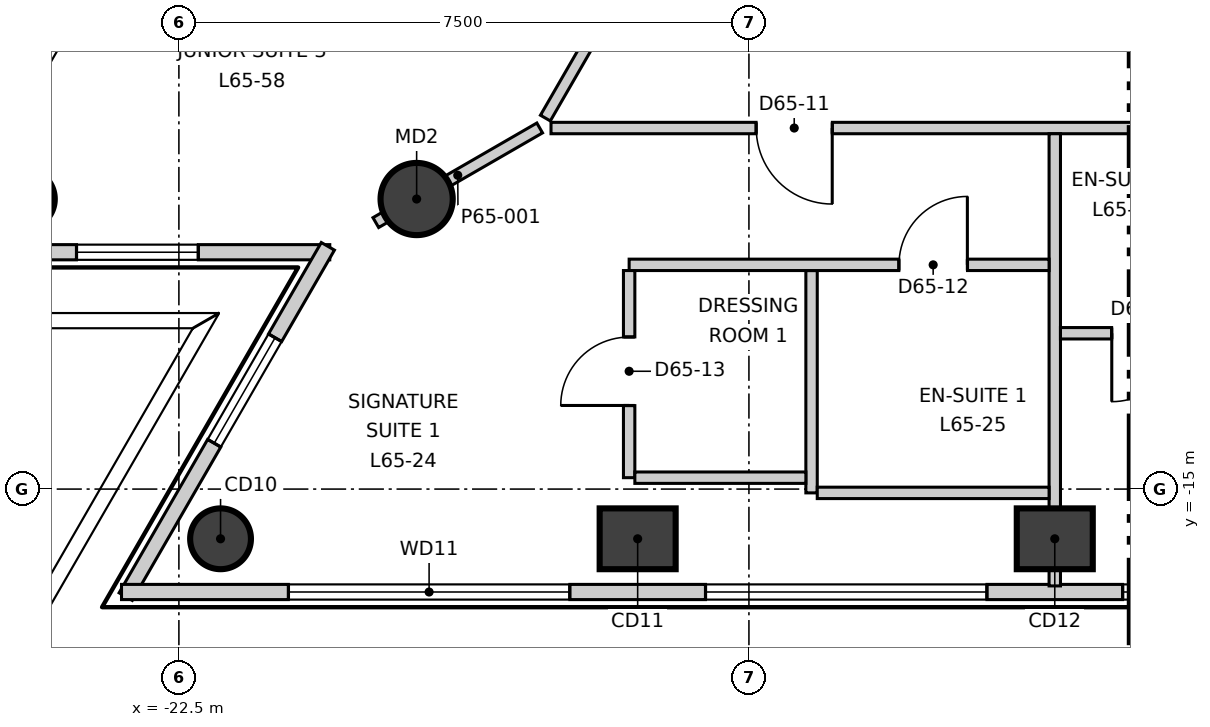
"""IFC4 building model, lengths in metres.
Left out: names, types, materials, properties, quantities, classifications, styles, units other than length and angle.
Written with IfcOpenShell. Run it as: python <this file> out.ifc"""

import sys

from ifc_helpers import new_model, si_unit, direction, frame, frame_2d, origin, origin_2d, place, context, subcontext, project, spatial, rectangle, circle, extrude, element, fill, save


model = new_model("IFC4")
c1 = context("Model", 3, precision=1e-05, world=origin(), true_north=direction((0.0, 1.0)))
c2 = subcontext(c1, "Body", "Model", "MODEL_VIEW")
j1 = project(units=[si_unit("LENGTHUNIT", "METRE"), si_unit("PLANEANGLEUNIT", "RADIAN")], contexts=[c1])
p1 = place(None, origin())
s1 = spatial("IfcSite", under=j1, at=p1, CompositionType="ELEMENT")
p2 = place(p1, origin())
s2 = spatial("IfcBuilding", under=s1, at=p2, CompositionType="ELEMENT")
p3 = place(p2, frame((0.0, 0.0, 279.1)))
s3 = spatial("IfcBuildingStorey", under=s2, at=p3, CompositionType="ELEMENT", Elevation=279.1)
for number, where, z_axis, x_axis in (
    (1, (-24.533, -11.184, -0.3), (0.0, 0.0, 1.0), (0.5, 0.866, 0.0)),
    (2, (-21.952, -15.654, -0.3), (0.0, 0.0, 1.0), (1.0, 0.0, 0.0)),
):
    element("IfcColumn", number, at=place(p3, frame(where, z_axis=z_axis, x_axis=x_axis)), inside=s3, PredefinedType="COLUMN", context=c2, shape_type="SweptSolid", body=[
        extrude(circle(Radius=0.4, at=origin_2d()), origin(), (0.0, 0.0, 1.0), 3.6),
    ])
for number, where, z_axis, x_axis in (
    (3, (-16.464, -15.654, -0.3), (0.0, 0.0, 1.0), (1.0, 0.0, 0.0)),
    (4, (-10.976, -15.654, -0.3), (0.0, 0.0, 1.0), (1.0, 0.0, 0.0)),
):
    element("IfcColumn", number, at=place(p3, frame(where, z_axis=z_axis, x_axis=x_axis)), inside=s3, PredefinedType="COLUMN", context=c2, shape_type="SweptSolid", body=[
        extrude(rectangle(XDim=1.0, YDim=0.8, at=origin_2d()), origin(), (0.0, 0.0, 1.0), 3.6),
    ])
p4 = place(p3, frame((-19.372, -11.184, -0.3), z_axis=(0.0, 0.0, 1.0), x_axis=(1.0, 0.0, 0.0)))
e5 = element("IfcColumn", 5, at=p4, inside=s3, PredefinedType="COLUMN", context=c2, shape_type="SweptSolid", body=[
    extrude(circle(Radius=0.475, at=origin_2d()), origin(), (0.0, 0.0, 1.0), 3.6),
])
p5 = place(p3, frame((-2.536, 28.316, 0.0), z_axis=(0.0, 0.0, 1.0), x_axis=(-0.500006870765, -0.86602143691, 0.0)))
e6 = element("IfcWall", 6, at=p5, inside=s3, PredefinedType="ELEMENTEDWALL", context=c2, shape_type="SweptSolid", body=[
    extrude(rectangle(XDim=46.49, YDim=0.2, at=frame_2d((23.245, 0.0))), origin(), (0.0, 0.0, 1.0), 3.3),
])
p6 = place(p5, frame((2.196, 0.0, 0.9)))
e7 = element("IfcOpeningElement", 7, at=p6, cuts=e6, PredefinedType="OPENING", context=c2, shape_type="SweptSolid", body=[
    extrude(rectangle(XDim=3.7, YDim=2.2, at=frame_2d((1.85, 1.1))), frame((0.0, 0.11, 0.0), z_axis=(0.0, -1.0, 0.0), x_axis=(1.0, 0.0, 0.0)), (0.0, 0.0, 1.0), 0.22),
])
p7 = place(p5, frame((7.684, 0.0, 0.9)))
e8 = element("IfcOpeningElement", 8, at=p7, cuts=e6, PredefinedType="OPENING", context=c2, shape_type="SweptSolid", body=[
    extrude(rectangle(XDim=3.7, YDim=2.2, at=frame_2d((1.85, 1.1))), frame((0.0, 0.11, 0.0), z_axis=(0.0, -1.0, 0.0), x_axis=(1.0, 0.0, 0.0)), (0.0, 0.0, 1.0), 0.22),
])
p8 = place(p5, frame((13.172, 0.0, 0.9)))
e9 = element("IfcOpeningElement", 9, at=p8, cuts=e6, PredefinedType="OPENING", context=c2, shape_type="SweptSolid", body=[
    extrude(rectangle(XDim=3.7, YDim=2.2, at=frame_2d((1.85, 1.1))), frame((0.0, 0.11, 0.0), z_axis=(0.0, -1.0, 0.0), x_axis=(1.0, 0.0, 0.0)), (0.0, 0.0, 1.0), 0.22),
])
p9 = place(p5, frame((18.66, 0.0, 0.9)))
e10 = element("IfcOpeningElement", 10, at=p9, cuts=e6, PredefinedType="OPENING", context=c2, shape_type="SweptSolid", body=[
    extrude(rectangle(XDim=3.7, YDim=2.2, at=frame_2d((1.85, 1.1))), frame((0.0, 0.11, 0.0), z_axis=(0.0, -1.0, 0.0), x_axis=(1.0, 0.0, 0.0)), (0.0, 0.0, 1.0), 0.22),
])
p10 = place(p5, frame((24.148, 0.0, 0.9)))
e11 = element("IfcOpeningElement", 11, at=p10, cuts=e6, PredefinedType="OPENING", context=c2, shape_type="SweptSolid", body=[
    extrude(rectangle(XDim=3.7, YDim=2.2, at=frame_2d((1.85, 1.1))), frame((0.0, 0.11, 0.0), z_axis=(0.0, -1.0, 0.0), x_axis=(1.0, 0.0, 0.0)), (0.0, 0.0, 1.0), 0.22),
])
p11 = place(p5, frame((29.636, 0.0, 0.9)))
e12 = element("IfcOpeningElement", 12, at=p11, cuts=e6, PredefinedType="OPENING", context=c2, shape_type="SweptSolid", body=[
    extrude(rectangle(XDim=3.7, YDim=2.2, at=frame_2d((1.85, 1.1))), frame((0.0, 0.11, 0.0), z_axis=(0.0, -1.0, 0.0), x_axis=(1.0, 0.0, 0.0)), (0.0, 0.0, 1.0), 0.22),
])
p12 = place(p5, frame((35.124, 0.0, 0.9)))
e13 = element("IfcOpeningElement", 13, at=p12, cuts=e6, PredefinedType="OPENING", context=c2, shape_type="SweptSolid", body=[
    extrude(rectangle(XDim=3.7, YDim=2.2, at=frame_2d((1.85, 1.1))), frame((0.0, 0.11, 0.0), z_axis=(0.0, -1.0, 0.0), x_axis=(1.0, 0.0, 0.0)), (0.0, 0.0, 1.0), 0.22),
])
p13 = place(p5, frame((40.612, 0.0, 0.9)))
e14 = element("IfcOpeningElement", 14, at=p13, cuts=e6, PredefinedType="OPENING", context=c2, shape_type="SweptSolid", body=[
    extrude(rectangle(XDim=3.7, YDim=2.2, at=frame_2d((1.85, 1.1))), frame((0.0, 0.11, 0.0), z_axis=(0.0, -1.0, 0.0), x_axis=(1.0, 0.0, 0.0)), (0.0, 0.0, 1.0), 0.22),
])
p14 = place(p3, frame((-25.836, -11.884, 0.0), z_axis=(0.0, 0.0, 1.0), x_axis=(1.0, 0.0, 0.0)))
e15 = element("IfcWall", 15, at=p14, inside=s3, PredefinedType="ELEMENTEDWALL", context=c2, shape_type="SweptSolid", body=[
    extrude(rectangle(XDim=5.321, YDim=0.2, at=frame_2d((2.661, 0.0))), origin(), (0.0, 0.0, 1.0), 3.3),
])
p15 = place(p14, frame((1.99, 0.0, 0.9)))
e16 = element("IfcOpeningElement", 16, at=p15, cuts=e15, PredefinedType="OPENING", context=c2, shape_type="SweptSolid", body=[
    extrude(rectangle(XDim=1.6, YDim=2.2, at=frame_2d((0.8, 1.1))), frame((0.0, 0.11, 0.0), z_axis=(0.0, -1.0, 0.0), x_axis=(1.0, 0.0, 0.0)), (0.0, 0.0, 1.0), 0.22),
])
p16 = place(p3, frame((-20.54, -11.806, 0.0), z_axis=(0.0, 0.0, 1.0), x_axis=(-0.499834978903, -0.866120657798, 0.0)))
e17 = element("IfcWall", 17, at=p16, inside=s3, PredefinedType="ELEMENTEDWALL", context=c2, shape_type="SweptSolid", body=[
    extrude(rectangle(XDim=5.322, YDim=0.2, at=frame_2d((2.661, 0.0))), origin(), (0.0, 0.0, 1.0), 3.3),
])
p17 = place(p16, frame((1.39, 0.0, 0.9)))
e18 = element("IfcOpeningElement", 18, at=p17, cuts=e17, PredefinedType="OPENING", context=c2, shape_type="SweptSolid", body=[
    extrude(rectangle(XDim=1.6, YDim=2.2, at=frame_2d((0.8, 1.1))), frame((0.0, 0.11, 0.0), z_axis=(0.0, -1.0, 0.0), x_axis=(1.0, 0.0, 0.0)), (0.0, 0.0, 1.0), 0.22),
])
p18 = place(p3, frame((-23.255, -16.354, 0.0), z_axis=(0.0, 0.0, 1.0), x_axis=(1.0, 0.0, 0.0)))
e19 = element("IfcWall", 19, at=p18, inside=s3, PredefinedType="ELEMENTEDWALL", context=c2, shape_type="SweptSolid", body=[
    extrude(rectangle(XDim=46.49, YDim=0.2, at=frame_2d((23.245, 0.0))), origin(), (0.0, 0.0, 1.0), 3.3),
])
p19 = place(p18, frame((2.197, 0.0, 0.9)))
e20 = element("IfcOpeningElement", 20, at=p19, cuts=e19, PredefinedType="OPENING", context=c2, shape_type="SweptSolid", body=[
    extrude(rectangle(XDim=3.7, YDim=2.2, at=frame_2d((1.85, 1.1))), frame((0.0, 0.11, 0.0), z_axis=(0.0, -1.0, 0.0), x_axis=(1.0, 0.0, 0.0)), (0.0, 0.0, 1.0), 0.22),
])
p20 = place(p18, frame((7.685, 0.0, 0.9)))
e21 = element("IfcOpeningElement", 21, at=p20, cuts=e19, PredefinedType="OPENING", context=c2, shape_type="SweptSolid", body=[
    extrude(rectangle(XDim=3.7, YDim=2.2, at=frame_2d((1.85, 1.1))), frame((0.0, 0.11, 0.0), z_axis=(0.0, -1.0, 0.0), x_axis=(1.0, 0.0, 0.0)), (0.0, 0.0, 1.0), 0.22),
])
p21 = place(p18, frame((13.173, 0.0, 0.9)))
e22 = element("IfcOpeningElement", 22, at=p21, cuts=e19, PredefinedType="OPENING", context=c2, shape_type="SweptSolid", body=[
    extrude(rectangle(XDim=3.7, YDim=2.2, at=frame_2d((1.85, 1.1))), frame((0.0, 0.11, 0.0), z_axis=(0.0, -1.0, 0.0), x_axis=(1.0, 0.0, 0.0)), (0.0, 0.0, 1.0), 0.22),
])
p22 = place(p18, frame((18.661, 0.0, 0.9)))
e23 = element("IfcOpeningElement", 23, at=p22, cuts=e19, PredefinedType="OPENING", context=c2, shape_type="SweptSolid", body=[
    extrude(rectangle(XDim=3.7, YDim=2.2, at=frame_2d((1.85, 1.1))), frame((0.0, 0.11, 0.0), z_axis=(0.0, -1.0, 0.0), x_axis=(1.0, 0.0, 0.0)), (0.0, 0.0, 1.0), 0.22),
])
p23 = place(p18, frame((24.149, 0.0, 0.9)))
e24 = element("IfcOpeningElement", 24, at=p23, cuts=e19, PredefinedType="OPENING", context=c2, shape_type="SweptSolid", body=[
    extrude(rectangle(XDim=3.7, YDim=2.2, at=frame_2d((1.85, 1.1))), frame((0.0, 0.11, 0.0), z_axis=(0.0, -1.0, 0.0), x_axis=(1.0, 0.0, 0.0)), (0.0, 0.0, 1.0), 0.22),
])
p24 = place(p18, frame((29.637, 0.0, 0.9)))
e25 = element("IfcOpeningElement", 25, at=p24, cuts=e19, PredefinedType="OPENING", context=c2, shape_type="SweptSolid", body=[
    extrude(rectangle(XDim=3.7, YDim=2.2, at=frame_2d((1.85, 1.1))), frame((0.0, 0.11, 0.0), z_axis=(0.0, -1.0, 0.0), x_axis=(1.0, 0.0, 0.0)), (0.0, 0.0, 1.0), 0.22),
])
p25 = place(p18, frame((35.125, 0.0, 0.9)))
e26 = element("IfcOpeningElement", 26, at=p25, cuts=e19, PredefinedType="OPENING", context=c2, shape_type="SweptSolid", body=[
    extrude(rectangle(XDim=3.7, YDim=2.2, at=frame_2d((1.85, 1.1))), frame((0.0, 0.11, 0.0), z_axis=(0.0, -1.0, 0.0), x_axis=(1.0, 0.0, 0.0)), (0.0, 0.0, 1.0), 0.22),
])
p26 = place(p18, frame((40.613, 0.0, 0.9)))
e27 = element("IfcOpeningElement", 27, at=p26, cuts=e19, PredefinedType="OPENING", context=c2, shape_type="SweptSolid", body=[
    extrude(rectangle(XDim=3.7, YDim=2.2, at=frame_2d((1.85, 1.1))), frame((0.0, 0.11, 0.0), z_axis=(0.0, -1.0, 0.0), x_axis=(1.0, 0.0, 0.0)), (0.0, 0.0, 1.0), 0.22),
])
p27 = place(p3, frame((-19.909, -11.494, 0.0), z_axis=(0.0, 0.0, 1.0), x_axis=(0.86600757835, 0.500030873288, 0.0)))
e28 = element("IfcWall", 28, at=p27, inside=s3, PredefinedType="PARTITIONING", context=c2, shape_type="SweptSolid", body=[
    extrude(rectangle(XDim=2.49, YDim=0.15, at=frame_2d((1.245, 0.0))), origin(), (0.0, 0.0, 1.0), 2.8),
])
p28 = place(p3, frame((-17.678, -10.119, 0.0), z_axis=(0.0, 0.0, 1.0), x_axis=(0.500003190174, 0.866023561929, 0.0)))
e29 = element("IfcWall", 29, at=p28, inside=s3, PredefinedType="PARTITIONING", context=c2, shape_type="SweptSolid", body=[
    extrude(rectangle(XDim=35.356, YDim=0.15, at=frame_2d((17.678, 0.0))), origin(), (0.0, 0.0, 1.0), 3.3),
])
p29 = place(p28, frame((28.706, 0.0, 0.0)))
e30 = element("IfcOpeningElement", 30, at=p29, cuts=e29, PredefinedType="OPENING", context=c2, shape_type="SweptSolid", body=[
    extrude(rectangle(XDim=1.0, YDim=2.1, at=frame_2d((0.5, 1.05))), frame((0.0, 0.085, 0.0), z_axis=(0.0, -1.0, 0.0), x_axis=(1.0, 0.0, 0.0)), (0.0, 0.0, 1.0), 0.17),
])
p30 = place(p28, frame((18.74, 0.0, 0.0)))
e31 = element("IfcOpeningElement", 31, at=p30, cuts=e29, PredefinedType="OPENING", context=c2, shape_type="SweptSolid", body=[
    extrude(rectangle(XDim=1.0, YDim=2.1, at=frame_2d((0.5, 1.05))), frame((0.0, 0.085, 0.0), z_axis=(0.0, -1.0, 0.0), x_axis=(1.0, 0.0, 0.0)), (0.0, 0.0, 1.0), 0.17),
])
p31 = place(p28, frame((9.352, 0.0, 0.0)))
e32 = element("IfcOpeningElement", 32, at=p31, cuts=e29, PredefinedType="OPENING", context=c2, shape_type="SweptSolid", body=[
    extrude(rectangle(XDim=1.0, YDim=2.1, at=frame_2d((0.5, 1.05))), frame((0.0, 0.085, 0.0), z_axis=(0.0, -1.0, 0.0), x_axis=(1.0, 0.0, 0.0)), (0.0, 0.0, 1.0), 0.17),
])
p32 = place(p28, frame((2.777, 0.0, 0.0)))
e33 = element("IfcOpeningElement", 33, at=p32, cuts=e29, PredefinedType="OPENING", context=c2, shape_type="SweptSolid", body=[
    extrude(rectangle(XDim=1.0, YDim=2.1, at=frame_2d((0.5, 1.05))), frame((0.0, 0.085, 0.0), z_axis=(0.0, -1.0, 0.0), x_axis=(1.0, 0.0, 0.0)), (0.0, 0.0, 1.0), 0.17),
])
p33 = place(p3, frame((-17.604, -10.25, 0.0), z_axis=(0.0, 0.0, 1.0), x_axis=(1.0, 0.0, 0.0)))
e34 = element("IfcWall", 34, at=p33, inside=s3, PredefinedType="PARTITIONING", context=c2, shape_type="SweptSolid", body=[
    extrude(rectangle(XDim=35.358, YDim=0.15, at=frame_2d((17.679, 0.0))), origin(), (0.0, 0.0, 1.0), 3.3),
])
p34 = place(p33, frame((2.7, 0.0, 0.0)))
e35 = element("IfcOpeningElement", 35, at=p34, cuts=e34, PredefinedType="OPENING", context=c2, shape_type="SweptSolid", body=[
    extrude(rectangle(XDim=1.0, YDim=2.1, at=frame_2d((0.5, 1.05))), frame((0.0, 0.085, 0.0), z_axis=(0.0, -1.0, 0.0), x_axis=(1.0, 0.0, 0.0)), (0.0, 0.0, 1.0), 0.17),
])
p35 = place(p33, frame((14.878, 0.0, 0.0)))
e36 = element("IfcOpeningElement", 36, at=p35, cuts=e34, PredefinedType="OPENING", context=c2, shape_type="SweptSolid", body=[
    extrude(rectangle(XDim=1.0, YDim=2.1, at=frame_2d((0.5, 1.05))), frame((0.0, 0.085, 0.0), z_axis=(0.0, -1.0, 0.0), x_axis=(1.0, 0.0, 0.0)), (0.0, 0.0, 1.0), 0.17),
])
p36 = place(p33, frame((9.578, 0.0, 0.0)))
e37 = element("IfcOpeningElement", 37, at=p36, cuts=e34, PredefinedType="OPENING", context=c2, shape_type="SweptSolid", body=[
    extrude(rectangle(XDim=0.9, YDim=2.1, at=frame_2d((0.45, 1.05))), frame((0.0, 0.085, 0.0), z_axis=(0.0, -1.0, 0.0), x_axis=(1.0, 0.0, 0.0)), (0.0, 0.0, 1.0), 0.17),
])
p37 = place(p33, frame((11.678, 0.0, 0.0)))
e38 = element("IfcOpeningElement", 38, at=p37, cuts=e34, PredefinedType="OPENING", context=c2, shape_type="SweptSolid", body=[
    extrude(rectangle(XDim=0.9, YDim=2.1, at=frame_2d((0.45, 1.05))), frame((0.0, 0.085, 0.0), z_axis=(0.0, -1.0, 0.0), x_axis=(1.0, 0.0, 0.0)), (0.0, 0.0, 1.0), 0.17),
])
p38 = place(p33, frame((25.854, 0.0, 0.0)))
e39 = element("IfcOpeningElement", 39, at=p38, cuts=e34, PredefinedType="OPENING", context=c2, shape_type="SweptSolid", body=[
    extrude(rectangle(XDim=1.0, YDim=2.1, at=frame_2d((0.5, 1.05))), frame((0.0, 0.085, 0.0), z_axis=(0.0, -1.0, 0.0), x_axis=(1.0, 0.0, 0.0)), (0.0, 0.0, 1.0), 0.17),
])
p39 = place(p33, frame((20.554, 0.0, 0.0)))
e40 = element("IfcOpeningElement", 40, at=p39, cuts=e34, PredefinedType="OPENING", context=c2, shape_type="SweptSolid", body=[
    extrude(rectangle(XDim=0.9, YDim=2.1, at=frame_2d((0.45, 1.05))), frame((0.0, 0.085, 0.0), z_axis=(0.0, -1.0, 0.0), x_axis=(1.0, 0.0, 0.0)), (0.0, 0.0, 1.0), 0.17),
])
p40 = place(p33, frame((22.654, 0.0, 0.0)))
e41 = element("IfcOpeningElement", 41, at=p40, cuts=e34, PredefinedType="OPENING", context=c2, shape_type="SweptSolid", body=[
    extrude(rectangle(XDim=0.9, YDim=2.1, at=frame_2d((0.45, 1.05))), frame((0.0, 0.085, 0.0), z_axis=(0.0, -1.0, 0.0), x_axis=(1.0, 0.0, 0.0)), (0.0, 0.0, 1.0), 0.17),
])
p41 = place(p33, frame((31.43, 0.0, 0.0)))
e42 = element("IfcOpeningElement", 42, at=p41, cuts=e34, PredefinedType="OPENING", context=c2, shape_type="SweptSolid", body=[
    extrude(rectangle(XDim=1.0, YDim=2.1, at=frame_2d((0.5, 1.05))), frame((0.0, 0.085, 0.0), z_axis=(0.0, -1.0, 0.0), x_axis=(1.0, 0.0, 0.0)), (0.0, 0.0, 1.0), 0.17),
])
p42 = place(p3, frame((-10.976, -16.274, 0.0), z_axis=(0.0, 0.0, 1.0), x_axis=(0.0, 1.0, 0.0)))
e43 = element("IfcWall", 43, at=p42, inside=s3, PredefinedType="PARTITIONING", context=c2, shape_type="SweptSolid", body=[
    extrude(rectangle(XDim=5.949, YDim=0.15, at=frame_2d((2.975, 0.0))), origin(), (0.0, 0.0, 1.0), 3.3),
])
p43 = place(p3, frame((-14.176, -15.05, 0.0), z_axis=(0.0, 0.0, 1.0), x_axis=(0.0, 1.0, 0.0)))
e44 = element("IfcWall", 44, at=p43, inside=s3, PredefinedType="PARTITIONING", context=c2, shape_type="SweptSolid", body=[
    extrude(rectangle(XDim=2.925, YDim=0.15, at=frame_2d((1.462, 0.0))), origin(), (0.0, 0.0, 1.0), 3.3),
])
p44 = place(p3, frame((-16.576, -12.05, 0.0), z_axis=(0.0, 0.0, 1.0), x_axis=(1.0, 0.0, 0.0)))
e45 = element("IfcWall", 45, at=p44, inside=s3, PredefinedType="PARTITIONING", context=c2, shape_type="SweptSolid", body=[
    extrude(rectangle(XDim=5.525, YDim=0.15, at=frame_2d((2.762, 0.0))), origin(), (0.0, 0.0, 1.0), 3.3),
])
p45 = place(p44, frame((3.55, 0.0, 0.0)))
e46 = element("IfcOpeningElement", 46, at=p45, cuts=e45, PredefinedType="OPENING", context=c2, shape_type="SweptSolid", body=[
    extrude(rectangle(XDim=0.9, YDim=2.1, at=frame_2d((0.45, 1.05))), frame((0.0, 0.085, 0.0), z_axis=(0.0, -1.0, 0.0), x_axis=(1.0, 0.0, 0.0)), (0.0, 0.0, 1.0), 0.17),
])
p46 = place(p3, frame((-16.576, -14.85, 0.0), z_axis=(0.0, 0.0, 1.0), x_axis=(0.0, 1.0, 0.0)))
e47 = element("IfcWall", 47, at=p46, inside=s3, PredefinedType="PARTITIONING", context=c2, shape_type="SweptSolid", body=[
    extrude(rectangle(XDim=2.725, YDim=0.15, at=frame_2d((1.363, 0.0))), origin(), (0.0, 0.0, 1.0), 3.3),
])
p47 = place(p46, frame((0.95, 0.0, 0.0)))
e48 = element("IfcOpeningElement", 48, at=p47, cuts=e47, PredefinedType="OPENING", context=c2, shape_type="SweptSolid", body=[
    extrude(rectangle(XDim=0.9, YDim=2.1, at=frame_2d((0.45, 1.05))), frame((0.0, 0.085, 0.0), z_axis=(0.0, -1.0, 0.0), x_axis=(1.0, 0.0, 0.0)), (0.0, 0.0, 1.0), 0.17),
])
p48 = place(p3, frame((-16.501, -14.85, 0.0), z_axis=(0.0, 0.0, 1.0), x_axis=(1.0, 0.0, 0.0)))
e49 = element("IfcWall", 49, at=p48, inside=s3, PredefinedType="PARTITIONING", context=c2, shape_type="SweptSolid", body=[
    extrude(rectangle(XDim=2.25, YDim=0.15, at=frame_2d((1.125, 0.0))), origin(), (0.0, 0.0, 1.0), 3.3),
])
p49 = place(p3, frame((-14.101, -15.05, 0.0), z_axis=(0.0, 0.0, 1.0), x_axis=(1.0, 0.0, 0.0)))
e50 = element("IfcWall", 50, at=p49, inside=s3, PredefinedType="PARTITIONING", context=c2, shape_type="SweptSolid", body=[
    extrude(rectangle(XDim=3.05, YDim=0.15, at=frame_2d((1.525, 0.0))), origin(), (0.0, 0.0, 1.0), 3.3),
])
p50 = place(p3, frame((-10.901, -12.95, 0.0), z_axis=(0.0, 0.0, 1.0), x_axis=(1.0, 0.0, 0.0)))
e51 = element("IfcWall", 51, at=p50, inside=s3, PredefinedType="PARTITIONING", context=c2, shape_type="SweptSolid", body=[
    extrude(rectangle(XDim=2.15, YDim=0.15, at=frame_2d((1.075, 0.0))), origin(), (0.0, 0.0, 1.0), 3.3),
])
p51 = place(p50, frame((0.675, 0.0, 0.0)))
e52 = element("IfcOpeningElement", 52, at=p51, cuts=e51, PredefinedType="OPENING", context=c2, shape_type="SweptSolid", body=[
    extrude(rectangle(XDim=0.9, YDim=2.1, at=frame_2d((0.45, 1.05))), frame((0.0, 0.085, 0.0), z_axis=(0.0, -1.0, 0.0), x_axis=(1.0, 0.0, 0.0)), (0.0, 0.0, 1.0), 0.17),
])
p52 = place(p13, origin())
e53 = element("IfcWindow", 53, at=p52, inside=s3, PartitioningType="SINGLE_PANEL", PredefinedType="WINDOW", context=c2, shape_type="SweptSolid", body=[
    extrude(rectangle(XDim=3.7, YDim=2.2, at=frame_2d((1.85, 1.1))), frame((0.0, 0.03, 0.0), z_axis=(0.0, -1.0, 0.0), x_axis=(1.0, 0.0, 0.0)), (0.0, 0.0, 1.0), 0.06),
])
fill(e14, e53)
p53 = place(p15, origin())
e54 = element("IfcWindow", 54, at=p53, inside=s3, PartitioningType="SINGLE_PANEL", PredefinedType="WINDOW", context=c2, shape_type="SweptSolid", body=[
    extrude(rectangle(XDim=1.6, YDim=2.2, at=frame_2d((0.8, 1.1))), frame((0.0, 0.03, 0.0), z_axis=(0.0, -1.0, 0.0), x_axis=(1.0, 0.0, 0.0)), (0.0, 0.0, 1.0), 0.06),
])
fill(e16, e54)
p54 = place(p17, origin())
e55 = element("IfcWindow", 55, at=p54, inside=s3, PartitioningType="SINGLE_PANEL", PredefinedType="WINDOW", context=c2, shape_type="SweptSolid", body=[
    extrude(rectangle(XDim=1.6, YDim=2.2, at=frame_2d((0.8, 1.1))), frame((0.0, 0.03, 0.0), z_axis=(0.0, -1.0, 0.0), x_axis=(1.0, 0.0, 0.0)), (0.0, 0.0, 1.0), 0.06),
])
fill(e18, e55)
p55 = place(p19, origin())
e56 = element("IfcWindow", 56, at=p55, inside=s3, PartitioningType="SINGLE_PANEL", PredefinedType="WINDOW", context=c2, shape_type="SweptSolid", body=[
    extrude(rectangle(XDim=3.7, YDim=2.2, at=frame_2d((1.85, 1.1))), frame((0.0, 0.03, 0.0), z_axis=(0.0, -1.0, 0.0), x_axis=(1.0, 0.0, 0.0)), (0.0, 0.0, 1.0), 0.06),
])
fill(e20, e56)
p56 = place(p20, origin())
e57 = element("IfcWindow", 57, at=p56, inside=s3, PartitioningType="SINGLE_PANEL", PredefinedType="WINDOW", context=c2, shape_type="SweptSolid", body=[
    extrude(rectangle(XDim=3.7, YDim=2.2, at=frame_2d((1.85, 1.1))), frame((0.0, 0.03, 0.0), z_axis=(0.0, -1.0, 0.0), x_axis=(1.0, 0.0, 0.0)), (0.0, 0.0, 1.0), 0.06),
])
fill(e21, e57)
p57 = place(p21, origin())
e58 = element("IfcWindow", 58, at=p57, inside=s3, PartitioningType="SINGLE_PANEL", PredefinedType="WINDOW", context=c2, shape_type="SweptSolid", body=[
    extrude(rectangle(XDim=3.7, YDim=2.2, at=frame_2d((1.85, 1.1))), frame((0.0, 0.03, 0.0), z_axis=(0.0, -1.0, 0.0), x_axis=(1.0, 0.0, 0.0)), (0.0, 0.0, 1.0), 0.06),
])
fill(e22, e58)
p58 = place(p34, origin())
e59 = element("IfcDoor", 59, at=p58, inside=s3, OperationType="SINGLE_SWING_RIGHT", PredefinedType="DOOR", context=c2, shape_type="SweptSolid", body=[
    extrude(rectangle(XDim=1.0, YDim=2.1, at=frame_2d((0.5, 1.05))), frame((0.0, 0.025, 0.0), z_axis=(0.0, -1.0, 0.0), x_axis=(1.0, 0.0, 0.0)), (0.0, 0.0, 1.0), 0.05),
])
fill(e35, e59)
p59 = place(p45, origin())
e60 = element("IfcDoor", 60, at=p59, inside=s3, OperationType="SINGLE_SWING_LEFT", PredefinedType="DOOR", context=c2, shape_type="SweptSolid", body=[
    extrude(rectangle(XDim=0.9, YDim=2.1, at=frame_2d((0.45, 1.05))), frame((0.0, 0.025, 0.0), z_axis=(0.0, -1.0, 0.0), x_axis=(1.0, 0.0, 0.0)), (0.0, 0.0, 1.0), 0.05),
])
fill(e46, e60)
p60 = place(p47, origin())
e61 = element("IfcDoor", 61, at=p60, inside=s3, OperationType="SINGLE_SWING_RIGHT", PredefinedType="DOOR", context=c2, shape_type="SweptSolid", body=[
    extrude(rectangle(XDim=0.9, YDim=2.1, at=frame_2d((0.45, 1.05))), frame((0.0, 0.025, 0.0), z_axis=(0.0, -1.0, 0.0), x_axis=(1.0, 0.0, 0.0)), (0.0, 0.0, 1.0), 0.05),
])
fill(e48, e61)
p61 = place(p51, origin())
e62 = element("IfcDoor", 62, at=p61, inside=s3, OperationType="SINGLE_SWING_LEFT", PredefinedType="DOOR", context=c2, shape_type="SweptSolid", body=[
    extrude(rectangle(XDim=0.9, YDim=2.1, at=frame_2d((0.45, 1.05))), frame((0.0, 0.025, 0.0), z_axis=(0.0, -1.0, 0.0), x_axis=(1.0, 0.0, 0.0)), (0.0, 0.0, 1.0), 0.05),
])
fill(e52, e62)
save(model, sys.argv[1])
